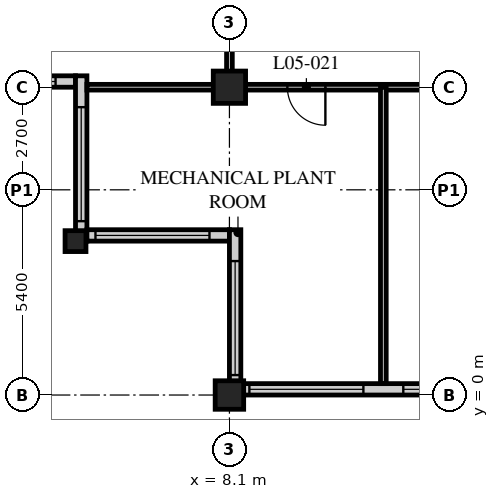
"""IFC4 building model, lengths in metres.
Left out: names, types, materials, properties, quantities, classifications, styles, units other than length and angle.
Written with IfcOpenShell. Run it as: python <this file> out.ifc"""

import sys

from ifc_helpers import new_model, si_unit, direction, frame, frame_2d, origin, origin_2d, place, context, subcontext, project, spatial, rectangle, hollow_rectangle, extrude, element, fill, save


model = new_model("IFC4")
c1 = context("Model", 3, precision=1e-05, world=origin(), true_north=direction((0.0, 1.0)))
c2 = subcontext(c1, "Body", "Model", "MODEL_VIEW")
j1 = project(units=[si_unit("LENGTHUNIT", "METRE"), si_unit("PLANEANGLEUNIT", "RADIAN")], contexts=[c1])
p1 = place(None, origin())
s1 = spatial("IfcSite", under=j1, at=p1, CompositionType="ELEMENT")
p2 = place(p1, origin())
s2 = spatial("IfcBuilding", under=s1, at=p2, CompositionType="ELEMENT")
p3 = place(p2, frame((0.0, 0.0, 27.6)))
s3 = spatial("IfcBuildingStorey", under=s2, at=p3, CompositionType="ELEMENT", Elevation=27.6)
p4 = place(p3, frame((4.05, 4.05, 0.0), z_axis=(0.0, 0.0, 1.0), x_axis=(1.0, 0.0, 0.0)))
e1 = element("IfcColumn", 1, at=p4, inside=s3, PredefinedType="COLUMN", context=c2, shape_type="SweptSolid", body=[
    extrude(hollow_rectangle(XDim=0.55, YDim=0.55, WallThickness=0.05, at=origin_2d()), origin(), (0.0, 0.0, 1.0), 5.4),
])
p5 = place(p3, frame((8.1, 0.0, 0.0), z_axis=(0.0, 0.0, 1.0), x_axis=(1.0, 0.0, 0.0)))
e2 = element("IfcColumn", 2, at=p5, inside=s3, PredefinedType="COLUMN", context=c2, shape_type="SweptSolid", body=[
    extrude(hollow_rectangle(XDim=0.75, YDim=0.75, WallThickness=0.07, at=origin_2d()), origin(), (0.0, 0.0, 1.0), 5.4),
])
p6 = place(p3, frame((8.1, 8.1, 0.0), z_axis=(0.0, 0.0, 1.0), x_axis=(1.0, 0.0, 0.0)))
e3 = element("IfcColumn", 3, at=p6, inside=s3, PredefinedType="COLUMN", context=c2, shape_type="SweptSolid", body=[
    extrude(hollow_rectangle(XDim=0.85, YDim=0.85, WallThickness=0.085, at=origin_2d()), origin(), (0.0, 0.0, 1.0), 5.4),
])
p7 = place(p3, frame((8.4, 0.15, 0.0), z_axis=(0.0, 0.0, 1.0), x_axis=(1.0, 0.0, 0.0)))
e4 = element("IfcWall", 4, at=p7, inside=s3, PredefinedType="SOLIDWALL", context=c2, shape_type="SweptSolid", body=[
    extrude(rectangle(XDim=40.2, YDim=0.3, at=frame_2d((20.1, 0.0))), origin(), (0.0, 0.0, 1.0), 5.19),
])
p8 = place(p7, frame((0.225, 0.0, 0.9)))
e5 = element("IfcOpeningElement", 5, at=p8, cuts=e4, PredefinedType="OPENING", context=c2, shape_type="SweptSolid", body=[
    extrude(rectangle(XDim=3.0, YDim=3.0, at=frame_2d((1.5, 1.5))), frame((0.0, 0.16, 0.0), z_axis=(0.0, -1.0, 0.0), x_axis=(1.0, 0.0, 0.0)), (0.0, 0.0, 1.0), 0.32),
])
p9 = place(p7, frame((4.275, 0.0, 0.9)))
e6 = element("IfcOpeningElement", 6, at=p9, cuts=e4, PredefinedType="OPENING", context=c2, shape_type="SweptSolid", body=[
    extrude(rectangle(XDim=3.0, YDim=3.0, at=frame_2d((1.5, 1.5))), frame((0.0, 0.16, 0.0), z_axis=(0.0, -1.0, 0.0), x_axis=(1.0, 0.0, 0.0)), (0.0, 0.0, 1.0), 0.32),
])
p10 = place(p7, frame((8.325, 0.0, 0.9)))
e7 = element("IfcOpeningElement", 7, at=p10, cuts=e4, PredefinedType="OPENING", context=c2, shape_type="SweptSolid", body=[
    extrude(rectangle(XDim=3.0, YDim=3.0, at=frame_2d((1.5, 1.5))), frame((0.0, 0.16, 0.0), z_axis=(0.0, -1.0, 0.0), x_axis=(1.0, 0.0, 0.0)), (0.0, 0.0, 1.0), 0.32),
])
p11 = place(p7, frame((12.375, 0.0, 0.9)))
e8 = element("IfcOpeningElement", 8, at=p11, cuts=e4, PredefinedType="OPENING", context=c2, shape_type="SweptSolid", body=[
    extrude(rectangle(XDim=3.0, YDim=3.0, at=frame_2d((1.5, 1.5))), frame((0.0, 0.16, 0.0), z_axis=(0.0, -1.0, 0.0), x_axis=(1.0, 0.0, 0.0)), (0.0, 0.0, 1.0), 0.32),
])
p12 = place(p7, frame((16.425, 0.0, 0.9)))
e9 = element("IfcOpeningElement", 9, at=p12, cuts=e4, PredefinedType="OPENING", context=c2, shape_type="SweptSolid", body=[
    extrude(rectangle(XDim=3.0, YDim=3.0, at=frame_2d((1.5, 1.5))), frame((0.0, 0.16, 0.0), z_axis=(0.0, -1.0, 0.0), x_axis=(1.0, 0.0, 0.0)), (0.0, 0.0, 1.0), 0.32),
])
p13 = place(p7, frame((20.475, 0.0, 0.9)))
e10 = element("IfcOpeningElement", 10, at=p13, cuts=e4, PredefinedType="OPENING", context=c2, shape_type="SweptSolid", body=[
    extrude(rectangle(XDim=3.0, YDim=3.0, at=frame_2d((1.5, 1.5))), frame((0.0, 0.16, 0.0), z_axis=(0.0, -1.0, 0.0), x_axis=(1.0, 0.0, 0.0)), (0.0, 0.0, 1.0), 0.32),
])
p14 = place(p7, frame((24.525, 0.0, 0.9)))
e11 = element("IfcOpeningElement", 11, at=p14, cuts=e4, PredefinedType="OPENING", context=c2, shape_type="SweptSolid", body=[
    extrude(rectangle(XDim=3.0, YDim=3.0, at=frame_2d((1.5, 1.5))), frame((0.0, 0.16, 0.0), z_axis=(0.0, -1.0, 0.0), x_axis=(1.0, 0.0, 0.0)), (0.0, 0.0, 1.0), 0.32),
])
p15 = place(p7, frame((28.575, 0.0, 0.9)))
e12 = element("IfcOpeningElement", 12, at=p15, cuts=e4, PredefinedType="OPENING", context=c2, shape_type="SweptSolid", body=[
    extrude(rectangle(XDim=3.0, YDim=3.0, at=frame_2d((1.5, 1.5))), frame((0.0, 0.16, 0.0), z_axis=(0.0, -1.0, 0.0), x_axis=(1.0, 0.0, 0.0)), (0.0, 0.0, 1.0), 0.32),
])
p16 = place(p7, frame((32.625, 0.0, 0.9)))
e13 = element("IfcOpeningElement", 13, at=p16, cuts=e4, PredefinedType="OPENING", context=c2, shape_type="SweptSolid", body=[
    extrude(rectangle(XDim=3.0, YDim=3.0, at=frame_2d((1.5, 1.5))), frame((0.0, 0.16, 0.0), z_axis=(0.0, -1.0, 0.0), x_axis=(1.0, 0.0, 0.0)), (0.0, 0.0, 1.0), 0.32),
])
p17 = place(p7, frame((36.675, 0.0, 0.9)))
e14 = element("IfcOpeningElement", 14, at=p17, cuts=e4, PredefinedType="OPENING", context=c2, shape_type="SweptSolid", body=[
    extrude(rectangle(XDim=3.0, YDim=3.0, at=frame_2d((1.5, 1.5))), frame((0.0, 0.16, 0.0), z_axis=(0.0, -1.0, 0.0), x_axis=(1.0, 0.0, 0.0)), (0.0, 0.0, 1.0), 0.32),
])
p18 = place(p3, frame((0.3, 8.25, 0.0), z_axis=(0.0, 0.0, 1.0), x_axis=(1.0, 0.0, 0.0)))
e15 = element("IfcWall", 15, at=p18, inside=s3, PredefinedType="SOLIDWALL", context=c2, shape_type="SweptSolid", body=[
    extrude(rectangle(XDim=3.75, YDim=0.3, at=frame_2d((1.875, 0.0))), origin(), (0.0, 0.0, 1.0), 5.19),
])
p19 = place(p18, frame((0.225, 0.0, 0.9)))
e16 = element("IfcOpeningElement", 16, at=p19, cuts=e15, PredefinedType="OPENING", context=c2, shape_type="SweptSolid", body=[
    extrude(rectangle(XDim=3.0, YDim=3.0, at=frame_2d((1.5, 1.5))), frame((0.0, 0.16, 0.0), z_axis=(0.0, -1.0, 0.0), x_axis=(1.0, 0.0, 0.0)), (0.0, 0.0, 1.0), 0.32),
])
p20 = place(p3, frame((4.2, 8.4, 0.0), z_axis=(0.0, 0.0, 1.0), x_axis=(0.0, -1.0, 0.0)))
e17 = element("IfcWall", 17, at=p20, inside=s3, PredefinedType="SOLIDWALL", context=c2, shape_type="SweptSolid", body=[
    extrude(rectangle(XDim=4.35, YDim=0.3, at=frame_2d((2.175, 0.0))), origin(), (0.0, 0.0, 1.0), 5.19),
])
p21 = place(p20, frame((0.825, 0.0, 0.9)))
e18 = element("IfcOpeningElement", 18, at=p21, cuts=e17, PredefinedType="OPENING", context=c2, shape_type="SweptSolid", body=[
    extrude(rectangle(XDim=3.0, YDim=3.0, at=frame_2d((1.5, 1.5))), frame((0.0, 0.16, 0.0), z_axis=(0.0, -1.0, 0.0), x_axis=(1.0, 0.0, 0.0)), (0.0, 0.0, 1.0), 0.32),
])
p22 = place(p3, frame((4.35, 4.2, 0.0), z_axis=(0.0, 0.0, 1.0), x_axis=(1.0, 0.0, 0.0)))
e19 = element("IfcWall", 19, at=p22, inside=s3, PredefinedType="SOLIDWALL", context=c2, shape_type="SweptSolid", body=[
    extrude(rectangle(XDim=3.75, YDim=0.3, at=frame_2d((1.875, 0.0))), origin(), (0.0, 0.0, 1.0), 5.19),
])
p23 = place(p22, frame((0.225, 0.0, 0.9)))
e20 = element("IfcOpeningElement", 20, at=p23, cuts=e19, PredefinedType="OPENING", context=c2, shape_type="SweptSolid", body=[
    extrude(rectangle(XDim=3.0, YDim=3.0, at=frame_2d((1.5, 1.5))), frame((0.0, 0.16, 0.0), z_axis=(0.0, -1.0, 0.0), x_axis=(1.0, 0.0, 0.0)), (0.0, 0.0, 1.0), 0.32),
])
p24 = place(p3, frame((8.25, 4.35, 0.0), z_axis=(0.0, 0.0, 1.0), x_axis=(0.0, -1.0, 0.0)))
e21 = element("IfcWall", 21, at=p24, inside=s3, PredefinedType="SOLIDWALL", context=c2, shape_type="SweptSolid", body=[
    extrude(rectangle(XDim=4.35, YDim=0.3, at=frame_2d((2.175, 0.0))), origin(), (0.0, 0.0, 1.0), 5.19),
])
p25 = place(p24, frame((0.825, 0.0, 0.9)))
e22 = element("IfcOpeningElement", 22, at=p25, cuts=e21, PredefinedType="OPENING", context=c2, shape_type="SweptSolid", body=[
    extrude(rectangle(XDim=3.0, YDim=3.0, at=frame_2d((1.5, 1.5))), frame((0.0, 0.16, 0.0), z_axis=(0.0, -1.0, 0.0), x_axis=(1.0, 0.0, 0.0)), (0.0, 0.0, 1.0), 0.32),
])
p26 = place(p3, frame((8.1, 8.1, 0.0), z_axis=(0.0, 0.0, 1.0), x_axis=(1.0, 0.0, 0.0)))
e23 = element("IfcWall", 23, at=p26, inside=s3, PredefinedType="PARTITIONING", context=c2, shape_type="SweptSolid", body=[
    extrude(rectangle(XDim=40.5, YDim=0.15, at=frame_2d((20.25, 0.0))), origin(), (0.0, 0.0, 1.0), 4.578),
])
p27 = place(p26, frame((11.25, 0.0, 0.0)))
e24 = element("IfcOpeningElement", 24, at=p27, cuts=e23, PredefinedType="OPENING", context=c2, shape_type="SweptSolid", body=[
    extrude(rectangle(XDim=1.8, YDim=2.4, at=frame_2d((0.9, 1.2))), frame((0.0, 0.085, 0.0), z_axis=(0.0, -1.0, 0.0), x_axis=(1.0, 0.0, 0.0)), (0.0, 0.0, 1.0), 0.17),
])
p28 = place(p26, frame((27.45, 0.0, 0.0)))
e25 = element("IfcOpeningElement", 25, at=p28, cuts=e23, PredefinedType="OPENING", context=c2, shape_type="SweptSolid", body=[
    extrude(rectangle(XDim=1.8, YDim=2.4, at=frame_2d((0.9, 1.2))), frame((0.0, 0.085, 0.0), z_axis=(0.0, -1.0, 0.0), x_axis=(1.0, 0.0, 0.0)), (0.0, 0.0, 1.0), 0.17),
])
p29 = place(p26, frame((1.525, 0.0, 0.0)))
e26 = element("IfcOpeningElement", 26, at=p29, cuts=e23, PredefinedType="OPENING", context=c2, shape_type="SweptSolid", body=[
    extrude(rectangle(XDim=1.0, YDim=2.1, at=frame_2d((0.5, 1.05))), frame((0.0, 0.085, 0.0), z_axis=(0.0, -1.0, 0.0), x_axis=(1.0, 0.0, 0.0)), (0.0, 0.0, 1.0), 0.17),
])
p30 = place(p26, frame((37.975, 0.0, 0.0)))
e27 = element("IfcOpeningElement", 27, at=p30, cuts=e23, PredefinedType="OPENING", context=c2, shape_type="SweptSolid", body=[
    extrude(rectangle(XDim=1.0, YDim=2.1, at=frame_2d((0.5, 1.05))), frame((0.0, 0.085, 0.0), z_axis=(0.0, -1.0, 0.0), x_axis=(1.0, 0.0, 0.0)), (0.0, 0.0, 1.0), 0.17),
])
p31 = place(p3, frame((8.1, 8.1, 0.0), z_axis=(0.0, 0.0, 1.0), x_axis=(0.0, 1.0, 0.0)))
e28 = element("IfcWall", 28, at=p31, inside=s3, PredefinedType="PARTITIONING", context=c2, shape_type="SweptSolid", body=[
    extrude(rectangle(XDim=34.35, YDim=0.15, at=frame_2d((17.175, 0.0))), origin(), (0.0, 0.0, 1.0), 4.578),
])
p32 = place(p31, frame((8.95, 0.0, 0.0)))
e29 = element("IfcOpeningElement", 29, at=p32, cuts=e28, PredefinedType="OPENING", context=c2, shape_type="SweptSolid", body=[
    extrude(rectangle(XDim=1.8, YDim=2.4, at=frame_2d((0.9, 1.2))), frame((0.0, 0.085, 0.0), z_axis=(0.0, -1.0, 0.0), x_axis=(1.0, 0.0, 0.0)), (0.0, 0.0, 1.0), 0.17),
])
p33 = place(p31, frame((25.125, 0.0, 0.0)))
e30 = element("IfcOpeningElement", 30, at=p33, cuts=e28, PredefinedType="OPENING", context=c2, shape_type="SweptSolid", body=[
    extrude(rectangle(XDim=1.8, YDim=2.4, at=frame_2d((0.9, 1.2))), frame((0.0, 0.085, 0.0), z_axis=(0.0, -1.0, 0.0), x_axis=(1.0, 0.0, 0.0)), (0.0, 0.0, 1.0), 0.17),
])
p34 = place(p3, frame((4.35, 8.1, 0.0), z_axis=(0.0, 0.0, 1.0), x_axis=(1.0, 0.0, 0.0)))
e31 = element("IfcWall", 31, at=p34, inside=s3, PredefinedType="PARTITIONING", context=c2, shape_type="SweptSolid", body=[
    extrude(rectangle(XDim=3.75, YDim=0.15, at=frame_2d((1.875, 0.0))), origin(), (0.0, 0.0, 1.0), 4.578),
])
p35 = place(p3, frame((12.15, 8.1, 0.0), z_axis=(0.0, 0.0, 1.0), x_axis=(0.0, -1.0, 0.0)))
e32 = element("IfcWall", 32, at=p35, inside=s3, PredefinedType="PARTITIONING", context=c2, shape_type="SweptSolid", body=[
    extrude(rectangle(XDim=7.8, YDim=0.15, at=frame_2d((3.9, 0.0))), origin(), (0.0, 0.0, 1.0), 5.19),
])
p36 = place(p8, origin())
e33 = element("IfcWindow", 33, at=p36, inside=s3, PartitioningType="SINGLE_PANEL", PredefinedType="USERDEFINED", context=c2, shape_type="SweptSolid", body=[
    extrude(rectangle(XDim=3.0, YDim=3.0, at=frame_2d((1.5, 1.5))), frame((0.0, 0.075, 0.0), z_axis=(0.0, -1.0, 0.0), x_axis=(1.0, 0.0, 0.0)), (0.0, 0.0, 1.0), 0.15),
])
fill(e5, e33)
p37 = place(p9, origin())
e34 = element("IfcWindow", 34, at=p37, inside=s3, PartitioningType="SINGLE_PANEL", PredefinedType="USERDEFINED", context=c2, shape_type="SweptSolid", body=[
    extrude(rectangle(XDim=3.0, YDim=3.0, at=frame_2d((1.5, 1.5))), frame((0.0, 0.075, 0.0), z_axis=(0.0, -1.0, 0.0), x_axis=(1.0, 0.0, 0.0)), (0.0, 0.0, 1.0), 0.15),
])
fill(e6, e34)
p38 = place(p19, origin())
e35 = element("IfcWindow", 35, at=p38, inside=s3, PartitioningType="SINGLE_PANEL", PredefinedType="WINDOW", context=c2, shape_type="SweptSolid", body=[
    extrude(rectangle(XDim=3.0, YDim=3.0, at=frame_2d((1.5, 1.5))), frame((0.0, 0.03, 0.0), z_axis=(0.0, -1.0, 0.0), x_axis=(1.0, 0.0, 0.0)), (0.0, 0.0, 1.0), 0.06),
])
fill(e16, e35)
p39 = place(p21, origin())
e36 = element("IfcWindow", 36, at=p39, inside=s3, PartitioningType="SINGLE_PANEL", PredefinedType="WINDOW", context=c2, shape_type="SweptSolid", body=[
    extrude(rectangle(XDim=3.0, YDim=3.0, at=frame_2d((1.5, 1.5))), frame((0.0, 0.03, 0.0), z_axis=(0.0, -1.0, 0.0), x_axis=(1.0, 0.0, 0.0)), (0.0, 0.0, 1.0), 0.06),
])
fill(e18, e36)
p40 = place(p23, origin())
e37 = element("IfcWindow", 37, at=p40, inside=s3, PartitioningType="SINGLE_PANEL", PredefinedType="WINDOW", context=c2, shape_type="SweptSolid", body=[
    extrude(rectangle(XDim=3.0, YDim=3.0, at=frame_2d((1.5, 1.5))), frame((0.0, 0.03, 0.0), z_axis=(0.0, -1.0, 0.0), x_axis=(1.0, 0.0, 0.0)), (0.0, 0.0, 1.0), 0.06),
])
fill(e20, e37)
p41 = place(p25, origin())
e38 = element("IfcWindow", 38, at=p41, inside=s3, PartitioningType="SINGLE_PANEL", PredefinedType="WINDOW", context=c2, shape_type="SweptSolid", body=[
    extrude(rectangle(XDim=3.0, YDim=3.0, at=frame_2d((1.5, 1.5))), frame((0.0, 0.03, 0.0), z_axis=(0.0, -1.0, 0.0), x_axis=(1.0, 0.0, 0.0)), (0.0, 0.0, 1.0), 0.06),
])
fill(e22, e38)
p42 = place(p29, origin())
e39 = element("IfcDoor", 39, at=p42, inside=s3, OperationType="SINGLE_SWING_LEFT", PredefinedType="DOOR", context=c2, shape_type="SweptSolid", body=[
    extrude(rectangle(XDim=1.0, YDim=2.1, at=frame_2d((0.5, 1.05))), frame((0.0, 0.025, 0.0), z_axis=(0.0, -1.0, 0.0), x_axis=(1.0, 0.0, 0.0)), (0.0, 0.0, 1.0), 0.05),
])
fill(e26, e39)
save(model, sys.argv[1])
